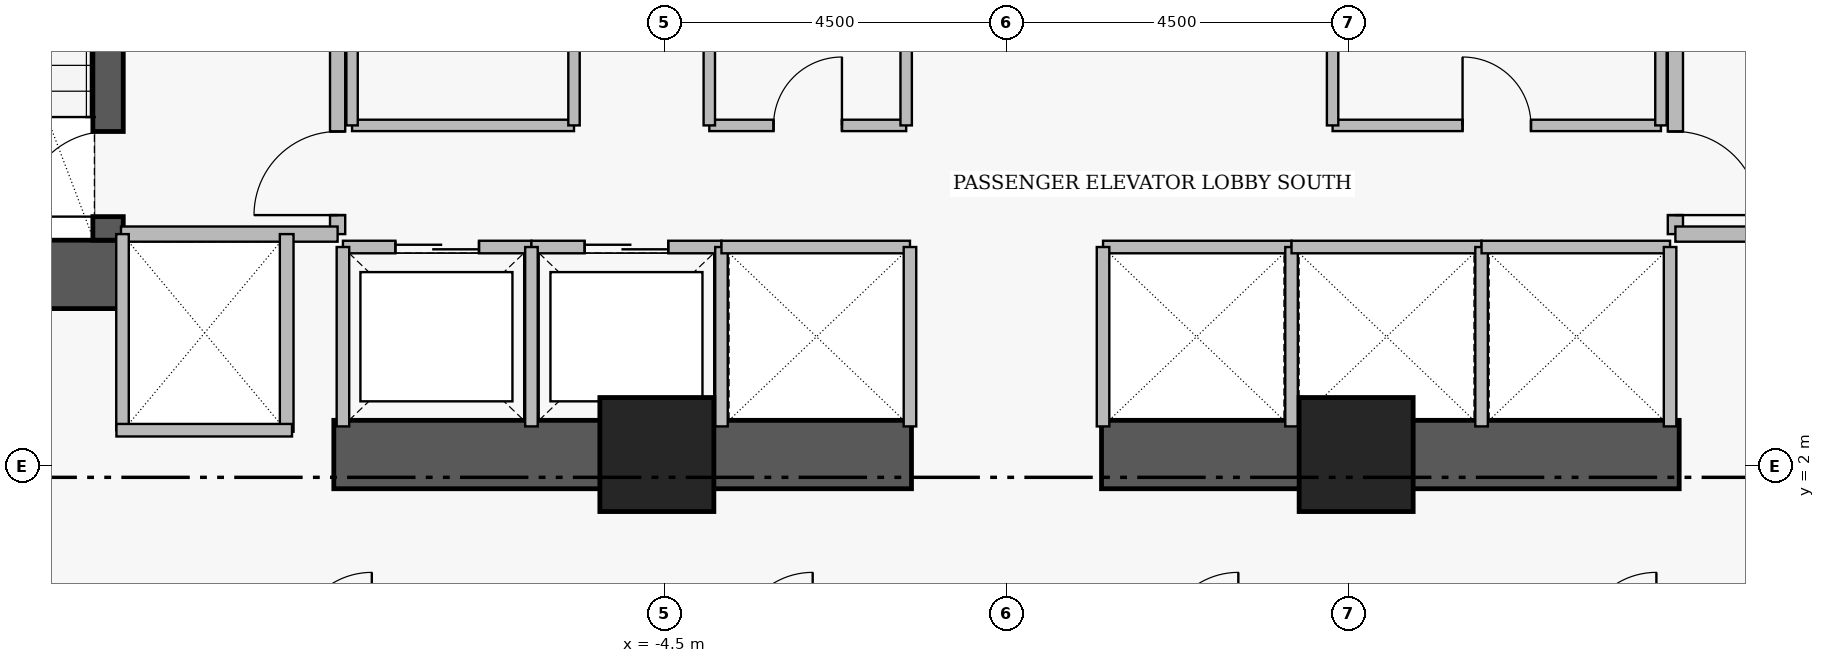
"""IFC4 building model, lengths in metres.
Left out: names, types, materials, properties, quantities, classifications, styles, units other than length and angle.
Written with IfcOpenShell. Run it as: python <this file> out.ifc"""

import sys

from ifc_helpers import new_model, si_unit, direction, frame, frame_2d, origin, origin_2d, place, context, subcontext, project, spatial, rectangle, extrude, element, fill, save


model = new_model("IFC4")
c1 = context("Model", 3, precision=1e-05, world=origin(), true_north=direction((0.0, 1.0)))
c2 = subcontext(c1, "Body", "Model", "MODEL_VIEW")
j1 = project(units=[si_unit("LENGTHUNIT", "METRE"), si_unit("PLANEANGLEUNIT", "RADIAN")], contexts=[c1])
p1 = place(None, origin())
s1 = spatial("IfcSite", under=j1, at=p1, CompositionType="ELEMENT")
p2 = place(p1, origin())
s2 = spatial("IfcBuilding", under=s1, at=p2, CompositionType="ELEMENT")
p3 = place(p2, frame((0.0, 0.0, 27.6)))
s3 = spatial("IfcBuildingStorey", under=s2, at=p3, CompositionType="ELEMENT", Elevation=27.6)
p4 = place(p3, frame((-16.31, 4.52, 0.0), z_axis=(0.0, 0.0, 1.0), x_axis=(1.0, 0.0, 0.0)))
e1 = element("IfcWall", 1, at=p4, inside=s3, PredefinedType="SHEAR", context=c2, shape_type="SweptSolid", body=[
    extrude(rectangle(XDim=4.71, YDim=0.9, at=frame_2d((2.355, 0.0))), origin(), (0.0, 0.0, 1.0), 3.46),
])
for number, where, z_axis, x_axis in (
    (2, (-8.85, 2.15, 0.0), (0.0, 0.0, 1.0), (1.0, 0.0, 0.0)),
    (3, (1.25, 2.15, 0.0), (0.0, 0.0, 1.0), (1.0, 0.0, 0.0)),
):
    element("IfcWall", number, at=place(p3, frame(where, z_axis=z_axis, x_axis=x_axis)), inside=s3, PredefinedType="SHEAR", context=c2, shape_type="SweptSolid", body=[
        extrude(rectangle(XDim=7.6, YDim=0.9, at=frame_2d((3.8, 0.0))), origin(), (0.0, 0.0, 1.0), 3.43),
    ])
p5 = place(p3, frame((-11.82, 4.97, 0.0), z_axis=(0.0, 0.0, 1.0), x_axis=(0.0, 1.0, 0.0)))
e4 = element("IfcWall", 4, at=p5, inside=s3, PredefinedType="SHEAR", context=c2, shape_type="SweptSolid", body=[
    extrude(rectangle(XDim=8.96, YDim=0.4, at=frame_2d((4.48, 0.0))), origin(), (0.0, 0.0, 1.0), 3.46),
])
p6 = place(p5, frame((0.31, 0.0, 0.0)))
e5 = element("IfcOpeningElement", 5, at=p6, cuts=e4, PredefinedType="OPENING", context=c2, shape_type="SweptSolid", body=[
    extrude(rectangle(XDim=1.12, YDim=2.22, at=frame_2d((0.56, 1.11))), frame((0.0, 0.21, 0.0), z_axis=(0.0, -1.0, 0.0), x_axis=(1.0, 0.0, 0.0)), (0.0, 0.0, 1.0), 0.42),
])
for number, where, z_axis, x_axis in (
    (6, (-4.6, 2.15, 0.0), (0.0, 0.0, 1.0), (1.0, 0.0, 0.0)),
    (7, (4.6, 2.15, 0.0), (0.0, 0.0, 1.0), (1.0, 0.0, 0.0)),
):
    element("IfcColumn", number, at=place(p3, frame(where, z_axis=z_axis, x_axis=x_axis)), inside=s3, PredefinedType="COLUMN", context=c2, shape_type="SweptSolid", body=[
        extrude(rectangle(XDim=1.5, YDim=1.5, at=origin_2d()), origin(), (0.0, 0.0, 1.0), 3.65),
    ])
p7 = place(p3, frame((-8.8, 5.05, 0.0), z_axis=(0.0, 0.0, 1.0), x_axis=(0.0, 1.0, 0.0)))
e8 = element("IfcWall", 8, at=p7, inside=s3, PredefinedType="PARTITIONING", context=c2, shape_type="SweptSolid", body=[
    extrude(rectangle(XDim=6.1, YDim=0.2, at=frame_2d((3.05, 0.0))), origin(), (0.0, 0.0, 1.0), 3.43),
])
p8 = place(p7, frame((0.25, 0.0, 0.0)))
e9 = element("IfcOpeningElement", 9, at=p8, cuts=e8, PredefinedType="OPENING", context=c2, shape_type="SweptSolid", body=[
    extrude(rectangle(XDim=1.1, YDim=2.2, at=frame_2d((0.55, 1.1))), frame((0.0, 0.11, 0.0), z_axis=(0.0, -1.0, 0.0), x_axis=(1.0, 0.0, 0.0)), (0.0, 0.0, 1.0), 0.22),
])
p9 = place(p7, frame((3.85, 0.0, 0.0)))
e10 = element("IfcOpeningElement", 10, at=p9, cuts=e8, PredefinedType="OPENING", context=c2, shape_type="SweptSolid", body=[
    extrude(rectangle(XDim=1.1, YDim=2.2, at=frame_2d((0.55, 1.1))), frame((0.0, 0.11, 0.0), z_axis=(0.0, -1.0, 0.0), x_axis=(1.0, 0.0, 0.0)), (0.0, 0.0, 1.0), 0.22),
])
p10 = place(p3, frame((8.8, 11.15, 0.0), z_axis=(0.0, 0.0, 1.0), x_axis=(0.0, -1.0, 0.0)))
e11 = element("IfcWall", 11, at=p10, inside=s3, PredefinedType="PARTITIONING", context=c2, shape_type="SweptSolid", body=[
    extrude(rectangle(XDim=6.1, YDim=0.2, at=frame_2d((3.05, 0.0))), origin(), (0.0, 0.0, 1.0), 3.43),
])
p11 = place(p10, frame((1.15, 0.0, 0.0)))
e12 = element("IfcOpeningElement", 12, at=p11, cuts=e11, PredefinedType="OPENING", context=c2, shape_type="SweptSolid", body=[
    extrude(rectangle(XDim=1.1, YDim=2.2, at=frame_2d((0.55, 1.1))), frame((0.0, 0.11, 0.0), z_axis=(0.0, -1.0, 0.0), x_axis=(1.0, 0.0, 0.0)), (0.0, 0.0, 1.0), 0.22),
])
p12 = place(p10, frame((4.75, 0.0, 0.0)))
e13 = element("IfcOpeningElement", 13, at=p12, cuts=e11, PredefinedType="OPENING", context=c2, shape_type="SweptSolid", body=[
    extrude(rectangle(XDim=1.1, YDim=2.2, at=frame_2d((0.55, 1.1))), frame((0.0, 0.11, 0.0), z_axis=(0.0, -1.0, 0.0), x_axis=(1.0, 0.0, 0.0)), (0.0, 0.0, 1.0), 0.22),
])
p13 = place(p3, frame((-8.73, 4.88, 0.0), z_axis=(0.0, 0.0, 1.0), x_axis=(1.0, 0.0, 0.0)))
e14 = element("IfcWall", 14, at=p13, inside=s3, PredefinedType="PARTITIONING", context=c2, shape_type="SweptSolid", body=[
    extrude(rectangle(XDim=2.48, YDim=0.165, at=frame_2d((1.24, 0.0))), origin(), (0.0, 0.0, 1.0), 3.43),
])
p14 = place(p13, frame((0.69, 0.0, 0.0)))
e15 = element("IfcOpeningElement", 15, at=p14, cuts=e14, PredefinedType="OPENING", context=c2, shape_type="SweptSolid", body=[
    extrude(rectangle(XDim=1.1, YDim=2.25, at=frame_2d((0.55, 1.125))), frame((0.0, 0.093, 0.0), z_axis=(0.0, -1.0, 0.0), x_axis=(1.0, 0.0, 0.0)), (0.0, 0.0, 1.0), 0.185),
])
p15 = place(p3, frame((-6.25, 4.88, 0.0), z_axis=(0.0, 0.0, 1.0), x_axis=(1.0, 0.0, 0.0)))
e16 = element("IfcWall", 16, at=p15, inside=s3, PredefinedType="PARTITIONING", context=c2, shape_type="SweptSolid", body=[
    extrude(rectangle(XDim=2.5, YDim=0.165, at=frame_2d((1.25, 0.0))), origin(), (0.0, 0.0, 1.0), 3.43),
])
p16 = place(p15, frame((0.7, 0.0, 0.0)))
e17 = element("IfcOpeningElement", 17, at=p16, cuts=e16, PredefinedType="OPENING", context=c2, shape_type="SweptSolid", body=[
    extrude(rectangle(XDim=1.1, YDim=2.25, at=frame_2d((0.55, 1.125))), frame((0.0, 0.093, 0.0), z_axis=(0.0, -1.0, 0.0), x_axis=(1.0, 0.0, 0.0)), (0.0, 0.0, 1.0), 0.185),
])
p17 = place(p3, frame((-3.91, 6.48, 0.0), z_axis=(0.0, 0.0, 1.0), x_axis=(1.0, 0.0, 0.0)))
e18 = element("IfcWall", 18, at=p17, inside=s3, PredefinedType="PARTITIONING", context=c2, shape_type="SweptSolid", body=[
    extrude(rectangle(XDim=2.59, YDim=0.15, at=frame_2d((1.295, 0.0))), origin(), (0.0, 0.0, 1.0), 3.43),
])
p18 = place(p17, frame((0.845, 0.0, 0.0)))
e19 = element("IfcOpeningElement", 19, at=p18, cuts=e18, PredefinedType="OPENING", context=c2, shape_type="SweptSolid", body=[
    extrude(rectangle(XDim=0.9, YDim=2.15, at=frame_2d((0.45, 1.075))), frame((0.0, 0.085, 0.0), z_axis=(0.0, -1.0, 0.0), x_axis=(1.0, 0.0, 0.0)), (0.0, 0.0, 1.0), 0.17),
])
p19 = place(p3, frame((4.29, 6.48, 0.0), z_axis=(0.0, 0.0, 1.0), x_axis=(1.0, 0.0, 0.0)))
e20 = element("IfcWall", 20, at=p19, inside=s3, PredefinedType="PARTITIONING", context=c2, shape_type="SweptSolid", body=[
    extrude(rectangle(XDim=4.32, YDim=0.15, at=frame_2d((2.16, 0.0))), origin(), (0.0, 0.0, 1.0), 3.43),
])
p20 = place(p19, frame((1.71, 0.0, 0.0)))
e21 = element("IfcOpeningElement", 21, at=p20, cuts=e20, PredefinedType="OPENING", context=c2, shape_type="SweptSolid", body=[
    extrude(rectangle(XDim=0.9, YDim=2.15, at=frame_2d((0.45, 1.075))), frame((0.0, 0.085, 0.0), z_axis=(0.0, -1.0, 0.0), x_axis=(1.0, 0.0, 0.0)), (0.0, 0.0, 1.0), 0.17),
])
for number, where, z_axis, x_axis in (
    (22, (-11.65, 5.05, 0.0), (0.0, 0.0, 1.0), (1.0, 0.0, 0.0)),
    (23, (8.8, 5.05, 0.0), (0.0, 0.0, 1.0), (1.0, 0.0, 0.0)),
):
    element("IfcWall", number, at=place(p3, frame(where, z_axis=z_axis, x_axis=x_axis)), inside=s3, PredefinedType="PARTITIONING", context=c2, shape_type="SweptSolid", body=[
        extrude(rectangle(XDim=2.85, YDim=0.2, at=frame_2d((1.425, 0.0))), origin(), (0.0, 0.0, 1.0), 3.43),
    ])
for number, where, z_axis, x_axis in (
    (24, (-8.73, 2.52, 0.0), (0.0, 0.0, 1.0), (0.0, 1.0, 0.0)),
    (25, (-6.25, 2.52, 0.0), (0.0, 0.0, 1.0), (0.0, 1.0, 0.0)),
    (26, (-3.75, 2.52, 0.0), (0.0, 0.0, 1.0), (0.0, 1.0, 0.0)),
):
    element("IfcWall", number, at=place(p3, frame(where, z_axis=z_axis, x_axis=x_axis)), inside=s3, PredefinedType="PARTITIONING", context=c2, shape_type="SweptSolid", body=[
        extrude(rectangle(XDim=2.36, YDim=0.165, at=frame_2d((1.18, 0.0))), origin(), (0.0, 0.0, 1.0), 3.43),
    ])
p21 = place(p3, frame((-3.75, 4.88, 0.0), z_axis=(0.0, 0.0, 1.0), x_axis=(1.0, 0.0, 0.0)))
e27 = element("IfcWall", 27, at=p21, inside=s3, PredefinedType="PARTITIONING", context=c2, shape_type="SweptSolid", body=[
    extrude(rectangle(XDim=2.48, YDim=0.165, at=frame_2d((1.24, 0.0))), origin(), (0.0, 0.0, 1.0), 3.43),
])
p22 = place(p3, frame((-1.27, 2.52, 0.0), z_axis=(0.0, 0.0, 1.0), x_axis=(0.0, 1.0, 0.0)))
e28 = element("IfcWall", 28, at=p22, inside=s3, PredefinedType="PARTITIONING", context=c2, shape_type="SweptSolid", body=[
    extrude(rectangle(XDim=2.36, YDim=0.165, at=frame_2d((1.18, 0.0))), origin(), (0.0, 0.0, 1.0), 3.43),
])
p23 = place(p3, frame((1.27, 4.88, 0.0), z_axis=(0.0, 0.0, 1.0), x_axis=(1.0, 0.0, 0.0)))
e29 = element("IfcWall", 29, at=p23, inside=s3, PredefinedType="PARTITIONING", context=c2, shape_type="SweptSolid", body=[
    extrude(rectangle(XDim=2.48, YDim=0.165, at=frame_2d((1.24, 0.0))), origin(), (0.0, 0.0, 1.0), 3.43),
])
for number, where, z_axis, x_axis in (
    (30, (1.27, 2.52, 0.0), (0.0, 0.0, 1.0), (0.0, 1.0, 0.0)),
    (31, (3.75, 2.52, 0.0), (0.0, 0.0, 1.0), (0.0, 1.0, 0.0)),
):
    element("IfcWall", number, at=place(p3, frame(where, z_axis=z_axis, x_axis=x_axis)), inside=s3, PredefinedType="PARTITIONING", context=c2, shape_type="SweptSolid", body=[
        extrude(rectangle(XDim=2.36, YDim=0.165, at=frame_2d((1.18, 0.0))), origin(), (0.0, 0.0, 1.0), 3.43),
    ])
p24 = place(p3, frame((3.75, 4.88, 0.0), z_axis=(0.0, 0.0, 1.0), x_axis=(1.0, 0.0, 0.0)))
e32 = element("IfcWall", 32, at=p24, inside=s3, PredefinedType="PARTITIONING", context=c2, shape_type="SweptSolid", body=[
    extrude(rectangle(XDim=2.5, YDim=0.165, at=frame_2d((1.25, 0.0))), origin(), (0.0, 0.0, 1.0), 3.43),
])
p25 = place(p3, frame((6.25, 2.52, 0.0), z_axis=(0.0, 0.0, 1.0), x_axis=(0.0, 1.0, 0.0)))
e33 = element("IfcWall", 33, at=p25, inside=s3, PredefinedType="PARTITIONING", context=c2, shape_type="SweptSolid", body=[
    extrude(rectangle(XDim=2.36, YDim=0.165, at=frame_2d((1.18, 0.0))), origin(), (0.0, 0.0, 1.0), 3.43),
])
p26 = place(p3, frame((6.25, 4.88, 0.0), z_axis=(0.0, 0.0, 1.0), x_axis=(1.0, 0.0, 0.0)))
e34 = element("IfcWall", 34, at=p26, inside=s3, PredefinedType="PARTITIONING", context=c2, shape_type="SweptSolid", body=[
    extrude(rectangle(XDim=2.48, YDim=0.165, at=frame_2d((1.24, 0.0))), origin(), (0.0, 0.0, 1.0), 3.43),
])
p27 = place(p3, frame((8.73, 2.52, 0.0), z_axis=(0.0, 0.0, 1.0), x_axis=(0.0, 1.0, 0.0)))
e35 = element("IfcWall", 35, at=p27, inside=s3, PredefinedType="PARTITIONING", context=c2, shape_type="SweptSolid", body=[
    extrude(rectangle(XDim=2.36, YDim=0.165, at=frame_2d((1.18, 0.0))), origin(), (0.0, 0.0, 1.0), 3.43),
])
p28 = place(p3, frame((-9.47, 2.45, 0.0), z_axis=(0.0, 0.0, 1.0), x_axis=(0.0, 1.0, 0.0)))
e36 = element("IfcWall", 36, at=p28, inside=s3, PredefinedType="PARTITIONING", context=c2, shape_type="SweptSolid", body=[
    extrude(rectangle(XDim=2.6, YDim=0.18, at=frame_2d((1.3, 0.0))), origin(), (0.0, 0.0, 1.0), 3.43),
])
p29 = place(p3, frame((-11.63, 2.47, 0.0), z_axis=(0.0, 0.0, 1.0), x_axis=(0.0, 1.0, 0.0)))
e37 = element("IfcWall", 37, at=p29, inside=s3, PredefinedType="PARTITIONING", context=c2, shape_type="SweptSolid", body=[
    extrude(rectangle(XDim=2.58, YDim=0.165, at=frame_2d((1.29, 0.0))), origin(), (0.0, 0.0, 1.0), 3.43),
])
p30 = place(p3, frame((-11.71, 2.47, 0.0), z_axis=(0.0, 0.0, 1.0), x_axis=(1.0, 0.0, 0.0)))
e38 = element("IfcWall", 38, at=p30, inside=s3, PredefinedType="PARTITIONING", context=c2, shape_type="SweptSolid", body=[
    extrude(rectangle(XDim=2.31, YDim=0.165, at=frame_2d((1.155, 0.0))), origin(), (0.0, 0.0, 1.0), 2.03),
])
p31 = place(p3, frame((-8.61, 6.48, 0.0), z_axis=(0.0, 0.0, 1.0), x_axis=(1.0, 0.0, 0.0)))
e39 = element("IfcWall", 39, at=p31, inside=s3, PredefinedType="PARTITIONING", context=c2, shape_type="SweptSolid", body=[
    extrude(rectangle(XDim=2.92, YDim=0.15, at=frame_2d((1.46, 0.0))), origin(), (0.0, 0.0, 1.0), 3.43),
])
for number, where, z_axis, x_axis in (
    (40, (-8.61, 6.48, 0.0), (0.0, 0.0, 1.0), (0.0, 1.0, 0.0)),
    (41, (-5.69, 6.48, 0.0), (0.0, 0.0, 1.0), (0.0, 1.0, 0.0)),
    (42, (-3.91, 6.48, 0.0), (0.0, 0.0, 1.0), (0.0, 1.0, 0.0)),
    (43, (-1.32, 6.48, 0.0), (0.0, 0.0, 1.0), (0.0, 1.0, 0.0)),
    (44, (4.29, 6.48, 0.0), (0.0, 0.0, 1.0), (0.0, 1.0, 0.0)),
    (45, (8.61, 6.48, 0.0), (0.0, 0.0, 1.0), (0.0, 1.0, 0.0)),
):
    element("IfcWall", number, at=place(p3, frame(where, z_axis=z_axis, x_axis=x_axis)), inside=s3, PredefinedType="PARTITIONING", context=c2, shape_type="SweptSolid", body=[
        extrude(rectangle(XDim=2.24, YDim=0.15, at=frame_2d((1.12, 0.0))), origin(), (0.0, 0.0, 1.0), 3.43),
    ])
p32 = place(p6, origin())
e46 = element("IfcDoor", 46, at=p32, inside=s3, OperationType="SINGLE_SWING_LEFT", PredefinedType="DOOR", context=c2, shape_type="SweptSolid", body=[
    extrude(rectangle(XDim=1.12, YDim=2.22, at=frame_2d((0.56, 1.11))), frame((0.0, 0.025, 0.0), z_axis=(0.0, -1.0, 0.0), x_axis=(1.0, 0.0, 0.0)), (0.0, 0.0, 1.0), 0.05),
])
fill(e5, e46)
p33 = place(p8, origin())
e47 = element("IfcDoor", 47, at=p33, inside=s3, OperationType="SINGLE_SWING_LEFT", PredefinedType="DOOR", context=c2, shape_type="SweptSolid", body=[
    extrude(rectangle(XDim=1.1, YDim=2.2, at=frame_2d((0.55, 1.1))), frame((0.0, 0.025, 0.0), z_axis=(0.0, -1.0, 0.0), x_axis=(1.0, 0.0, 0.0)), (0.0, 0.0, 1.0), 0.05),
])
fill(e9, e47)
p34 = place(p12, origin())
e48 = element("IfcDoor", 48, at=p34, inside=s3, OperationType="SINGLE_SWING_RIGHT", PredefinedType="DOOR", context=c2, shape_type="SweptSolid", body=[
    extrude(rectangle(XDim=1.1, YDim=2.2, at=frame_2d((0.55, 1.1))), frame((0.0, 0.025, 0.0), z_axis=(0.0, -1.0, 0.0), x_axis=(1.0, 0.0, 0.0)), (0.0, 0.0, 1.0), 0.05),
])
fill(e13, e48)
p35 = place(p14, origin())
e49 = element("IfcDoor", 49, at=p35, inside=s3, OperationType="SLIDING_TO_LEFT", PredefinedType="DOOR", context=c2, shape_type="SweptSolid", body=[
    extrude(rectangle(XDim=1.1, YDim=2.25, at=frame_2d((0.55, 1.125))), frame((0.0, 0.025, 0.0), z_axis=(0.0, -1.0, 0.0), x_axis=(1.0, 0.0, 0.0)), (0.0, 0.0, 1.0), 0.05),
])
fill(e15, e49)
p36 = place(p16, origin())
e50 = element("IfcDoor", 50, at=p36, inside=s3, OperationType="SLIDING_TO_LEFT", PredefinedType="DOOR", context=c2, shape_type="SweptSolid", body=[
    extrude(rectangle(XDim=1.1, YDim=2.25, at=frame_2d((0.55, 1.125))), frame((0.0, 0.025, 0.0), z_axis=(0.0, -1.0, 0.0), x_axis=(1.0, 0.0, 0.0)), (0.0, 0.0, 1.0), 0.05),
])
fill(e17, e50)
p37 = place(p18, origin())
e51 = element("IfcDoor", 51, at=p37, inside=s3, OperationType="SINGLE_SWING_RIGHT", PredefinedType="DOOR", context=c2, shape_type="SweptSolid", body=[
    extrude(rectangle(XDim=0.9, YDim=2.15, at=frame_2d((0.45, 1.075))), frame((0.0, 0.025, 0.0), z_axis=(0.0, -1.0, 0.0), x_axis=(1.0, 0.0, 0.0)), (0.0, 0.0, 1.0), 0.05),
])
fill(e19, e51)
p38 = place(p20, origin())
e52 = element("IfcDoor", 52, at=p38, inside=s3, OperationType="SINGLE_SWING_LEFT", PredefinedType="DOOR", context=c2, shape_type="SweptSolid", body=[
    extrude(rectangle(XDim=0.9, YDim=2.15, at=frame_2d((0.45, 1.075))), frame((0.0, 0.025, 0.0), z_axis=(0.0, -1.0, 0.0), x_axis=(1.0, 0.0, 0.0)), (0.0, 0.0, 1.0), 0.05),
])
fill(e21, e52)
save(model, sys.argv[1])
